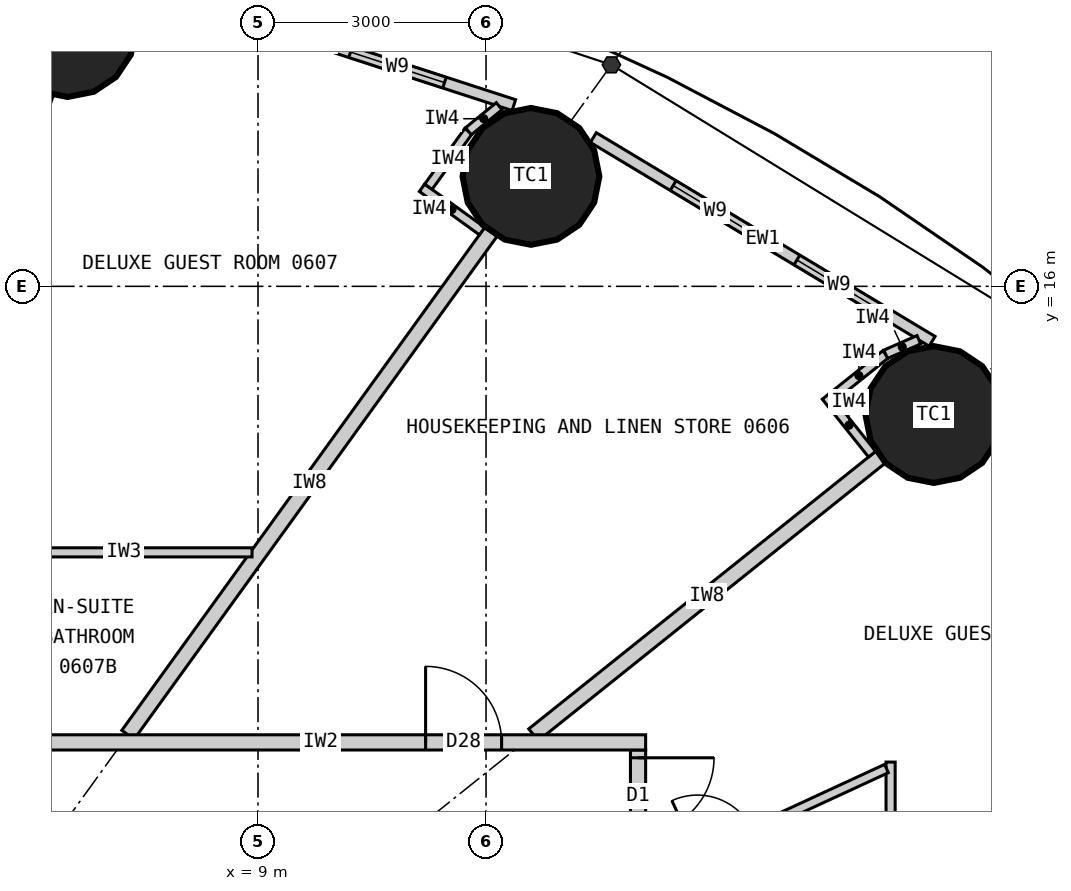
"""IFC4 building model, lengths in metres.
Left out: names, types, materials, properties, quantities, classifications, styles, units other than length and angle.
Written with IfcOpenShell. Run it as: python <this file> out.ifc"""

import sys

from ifc_helpers import new_model, si_unit, direction, frame, frame_2d, origin, origin_2d, place, context, subcontext, project, spatial, rectangle, circle, extrude, element, fill, save


model = new_model("IFC4")
c1 = context("Model", 3, precision=1e-05, world=origin(), true_north=direction((0.0, 1.0)))
c2 = subcontext(c1, "Body", "Model", "MODEL_VIEW")
j1 = project(units=[si_unit("LENGTHUNIT", "METRE"), si_unit("PLANEANGLEUNIT", "RADIAN")], contexts=[c1])
p1 = place(None, origin())
s1 = spatial("IfcSite", under=j1, at=p1, CompositionType="ELEMENT")
p2 = place(p1, origin())
s2 = spatial("IfcBuilding", under=s1, at=p2, CompositionType="ELEMENT")
p3 = place(p2, frame((0.0, 0.0, 32.7)))
s3 = spatial("IfcBuildingStorey", under=s2, at=p3, CompositionType="ELEMENT", Elevation=32.7)
for number, where, z_axis, x_axis in (
    (1, (17.892, 14.313, 0.0), (0.0, 0.0, 1.0), (1.0, 0.0, 0.0)),
    (2, (12.591, 17.447, 0.0), (0.0, 0.0, 1.0), (1.0, 0.0, 0.0)),
    (3, (6.495, 19.391, 0.0), (0.0, 0.0, 1.0), (1.0, 0.0, 0.0)),
):
    element("IfcColumn", number, at=place(p3, frame(where, z_axis=z_axis, x_axis=x_axis)), inside=s3, PredefinedType="COLUMN", context=c2, shape_type="SweptSolid", body=[
        extrude(circle(Radius=0.9, at=origin_2d()), origin(), (0.0, 0.0, 1.0), 3.3),
    ])
p4 = place(p3, frame((17.869, 15.277, 0.0), z_axis=(0.0, 0.0, 1.0), x_axis=(-0.856958191554, 0.515385931054, 0.0)))
e4 = element("IfcWall", 4, at=p4, inside=s3, PredefinedType="ELEMENTEDWALL", context=c2, shape_type="SweptSolid", body=[
    extrude(rectangle(XDim=5.201, YDim=0.15, at=frame_2d((2.601, 0.0))), origin(), (0.0, 0.0, 1.0), 3.12),
])
p5 = place(p4, frame((0.776, 0.0, 0.9)))
e5 = element("IfcOpeningElement", 5, at=p5, cuts=e4, PredefinedType="OPENING", context=c2, shape_type="SweptSolid", body=[
    extrude(rectangle(XDim=1.3, YDim=1.9, at=frame_2d((0.65, 0.95))), frame((0.0, 0.085, 0.0), z_axis=(0.0, -1.0, 0.0), x_axis=(1.0, 0.0, 0.0)), (0.0, 0.0, 1.0), 0.17),
])
p6 = place(p4, frame((2.676, 0.0, 0.9)))
e6 = element("IfcOpeningElement", 6, at=p6, cuts=e4, PredefinedType="OPENING", context=c2, shape_type="SweptSolid", body=[
    extrude(rectangle(XDim=1.3, YDim=1.9, at=frame_2d((0.65, 0.95))), frame((0.0, 0.085, 0.0), z_axis=(0.0, -1.0, 0.0), x_axis=(1.0, 0.0, 0.0)), (0.0, 0.0, 1.0), 0.17),
])
p7 = place(p3, frame((12.366, 18.384, 0.0), z_axis=(0.0, 0.0, 1.0), x_axis=(-0.951138486029, 0.308764603532, 0.0)))
e7 = element("IfcWall", 7, at=p7, inside=s3, PredefinedType="ELEMENTEDWALL", context=c2, shape_type="SweptSolid", body=[
    extrude(rectangle(XDim=5.444, YDim=0.15, at=frame_2d((2.722, 0.0))), origin(), (0.0, 0.0, 1.0), 3.12),
])
p8 = place(p7, frame((0.96, 0.0, 0.9)))
e8 = element("IfcOpeningElement", 8, at=p8, cuts=e7, PredefinedType="OPENING", context=c2, shape_type="SweptSolid", body=[
    extrude(rectangle(XDim=1.3, YDim=1.9, at=frame_2d((0.65, 0.95))), frame((0.0, 0.085, 0.0), z_axis=(0.0, -1.0, 0.0), x_axis=(1.0, 0.0, 0.0)), (0.0, 0.0, 1.0), 0.17),
])
p9 = place(p7, frame((2.86, 0.0, 0.9)))
e9 = element("IfcOpeningElement", 9, at=p9, cuts=e7, PredefinedType="OPENING", context=c2, shape_type="SweptSolid", body=[
    extrude(rectangle(XDim=1.3, YDim=1.9, at=frame_2d((0.65, 0.95))), frame((0.0, 0.085, 0.0), z_axis=(0.0, -1.0, 0.0), x_axis=(1.0, 0.0, 0.0)), (0.0, 0.0, 1.0), 0.17),
])
p10 = place(p3, frame((14.1, 6.512, 0.0), z_axis=(0.0, 0.0, 1.0), x_axis=(0.907842433118, 0.41931147925, 0.0)))
e10 = element("IfcWall", 10, at=p10, inside=s3, PredefinedType="PARTITIONING", context=c2, shape_type="SweptSolid", body=[
    extrude(rectangle(XDim=7.823, YDim=0.2, at=frame_2d((3.912, 0.0))), origin(), (0.0, 0.0, 1.0), 2.32),
])
p11 = place(p3, frame((12.625, 10.1, 0.0), z_axis=(0.0, 0.0, 1.0), x_axis=(0.780872884676, 0.624689953479, 0.0)))
e11 = element("IfcWall", 11, at=p11, inside=s3, PredefinedType="PARTITIONING", context=c2, shape_type="SweptSolid", body=[
    extrude(rectangle(XDim=5.845, YDim=0.2, at=frame_2d((2.922, 0.0))), origin(), (0.0, 0.0, 1.0), 2.32),
])
p12 = place(p3, frame((7.289, 10.1, 0.0), z_axis=(0.0, 0.0, 1.0), x_axis=(0.585216319319, 0.810877216108, 0.0)))
e12 = element("IfcWall", 12, at=p12, inside=s3, PredefinedType="PARTITIONING", context=c2, shape_type="SweptSolid", body=[
    extrude(rectangle(XDim=8.16, YDim=0.2, at=frame_2d((4.08, 0.0))), origin(), (0.0, 0.0, 1.0), 2.32),
])
p13 = place(p3, frame((3.383, 10.1, 0.0), z_axis=(0.0, 0.0, 1.0), x_axis=(0.317593727596, 0.948226884344, 0.0)))
e13 = element("IfcWall", 13, at=p13, inside=s3, PredefinedType="PARTITIONING", context=c2, shape_type="SweptSolid", body=[
    extrude(rectangle(XDim=8.899, YDim=0.2, at=frame_2d((4.449, 0.0))), origin(), (0.0, 0.0, 1.0), 2.32),
])
p14 = place(p3, frame((17.323, 8.101, 0.0), z_axis=(0.0, 0.0, 1.0), x_axis=(0.0, 1.0, 0.0)))
e14 = element("IfcWall", 14, at=p14, inside=s3, PredefinedType="PARTITIONING", context=c2, shape_type="SweptSolid", body=[
    extrude(rectangle(XDim=1.64, YDim=0.12, at=frame_2d((0.82, 0.0))), origin(), (0.0, 0.0, 1.0), 3.12),
])
p15 = place(p3, frame((14.1, 8.193, 0.0), z_axis=(0.0, 0.0, 1.0), x_axis=(0.907836493557, 0.419324338628, 0.0)))
e15 = element("IfcWall", 15, at=p15, inside=s3, PredefinedType="PARTITIONING", context=c2, shape_type="SweptSolid", body=[
    extrude(rectangle(XDim=3.49, YDim=0.12, at=frame_2d((1.745, 0.0))), origin(), (0.0, 0.0, 1.0), 3.12),
])
p16 = place(p15, frame((0.75, 0.0, 0.0)))
e16 = element("IfcOpeningElement", 16, at=p16, cuts=e15, PredefinedType="OPENING", context=c2, shape_type="SweptSolid", body=[
    extrude(rectangle(XDim=0.8, YDim=2.1, at=frame_2d((0.4, 1.05))), frame((0.0, 0.07, 0.0), z_axis=(0.0, -1.0, 0.0), x_axis=(1.0, 0.0, 0.0)), (0.0, 0.0, 1.0), 0.14),
])
p17 = place(p3, frame((8.921, 12.5, 0.0), z_axis=(0.0, 0.0, 1.0), x_axis=(-1.0, 0.0, 0.0)))
e17 = element("IfcWall", 17, at=p17, inside=s3, PredefinedType="PARTITIONING", context=c2, shape_type="SweptSolid", body=[
    extrude(rectangle(XDim=3.372, YDim=0.12, at=frame_2d((1.686, 0.0))), origin(), (0.0, 0.0, 1.0), 3.12),
])
p18 = place(p3, frame((14.0, 4.772, 0.0), z_axis=(0.0, 0.0, 1.0), x_axis=(0.0, 1.0, 0.0)))
e18 = element("IfcWall", 18, at=p18, inside=s3, PredefinedType="PARTITIONING", context=c2, shape_type="SweptSolid", body=[
    extrude(rectangle(XDim=5.127, YDim=0.2, at=frame_2d((2.564, 0.0))), origin(), (0.0, 0.0, 1.0), 3.12),
])
p19 = place(p18, frame((4.025, 0.0, 0.0)))
e19 = element("IfcOpeningElement", 19, at=p19, cuts=e18, PredefinedType="OPENING", context=c2, shape_type="SweptSolid", body=[
    extrude(rectangle(XDim=1.0, YDim=2.2, at=frame_2d((0.5, 1.1))), frame((0.0, 0.11, 0.0), z_axis=(0.0, -1.0, 0.0), x_axis=(1.0, 0.0, 0.0)), (0.0, 0.0, 1.0), 0.22),
])
p20 = place(p3, frame((5.549, 10.0, 0.0), z_axis=(0.0, 0.0, 1.0), x_axis=(1.0, 0.0, 0.0)))
e20 = element("IfcWall", 20, at=p20, inside=s3, PredefinedType="PARTITIONING", context=c2, shape_type="SweptSolid", body=[
    extrude(rectangle(XDim=8.551, YDim=0.2, at=frame_2d((4.275, 0.0))), origin(), (0.0, 0.0, 1.0), 3.12),
])
p21 = place(p20, frame((5.656, 0.0, 0.0)))
e21 = element("IfcOpeningElement", 21, at=p21, cuts=e20, PredefinedType="OPENING", context=c2, shape_type="SweptSolid", body=[
    extrude(rectangle(XDim=1.0, YDim=2.2, at=frame_2d((0.5, 1.1))), frame((0.0, 0.11, 0.0), z_axis=(0.0, -1.0, 0.0), x_axis=(1.0, 0.0, 0.0)), (0.0, 0.0, 1.0), 0.22),
])
p22 = place(p3, frame((17.08, 13.792, 0.0), z_axis=(0.0, 0.0, 1.0), x_axis=(-0.624756144097, 0.780819928289, 0.0)))
e22 = element("IfcWall", 22, at=p22, inside=s3, PredefinedType="PARTITIONING", context=c2, shape_type="SweptSolid", body=[
    extrude(rectangle(XDim=0.975, YDim=0.12, at=frame_2d((0.487, 0.0))), origin(), (0.0, 0.0, 1.0), 3.12),
])
p23 = place(p3, frame((16.555, 14.543, 0.0), z_axis=(0.0, 0.0, 1.0), x_axis=(0.780789399477, 0.62479429708, 0.0)))
e23 = element("IfcWall", 23, at=p23, inside=s3, PredefinedType="PARTITIONING", context=c2, shape_type="SweptSolid", body=[
    extrude(rectangle(XDim=0.9, YDim=0.12, at=frame_2d((0.45, 0.0))), origin(), (0.0, 0.0, 1.0), 3.12),
])
p24 = place(p3, frame((17.258, 15.106, 0.0), z_axis=(0.0, 0.0, 1.0), x_axis=(0.916098562583, 0.400953143937, 0.0)))
e24 = element("IfcWall", 24, at=p24, inside=s3, PredefinedType="PARTITIONING", context=c2, shape_type="SweptSolid", body=[
    extrude(rectangle(XDim=0.477, YDim=0.12, at=frame_2d((0.238, 0.0))), origin(), (0.0, 0.0, 1.0), 3.12),
])
p25 = place(p3, frame((11.948, 16.727, 0.0), z_axis=(0.0, 0.0, 1.0), x_axis=(-0.810897160646, 0.585188683123, 0.0)))
e25 = element("IfcWall", 25, at=p25, inside=s3, PredefinedType="PARTITIONING", context=c2, shape_type="SweptSolid", body=[
    extrude(rectangle(XDim=0.975, YDim=0.12, at=frame_2d((0.487, 0.0))), origin(), (0.0, 0.0, 1.0), 3.12),
])
p26 = place(p3, frame((11.241, 17.31, 0.0), z_axis=(0.0, 0.0, 1.0), x_axis=(0.585054732094, 0.810993810367, 0.0)))
e26 = element("IfcWall", 26, at=p26, inside=s3, PredefinedType="PARTITIONING", context=c2, shape_type="SweptSolid", body=[
    extrude(rectangle(XDim=0.9, YDim=0.12, at=frame_2d((0.45, 0.0))), origin(), (0.0, 0.0, 1.0), 3.12),
])
p27 = place(p3, frame((11.768, 18.04, 0.0), z_axis=(0.0, 0.0, 1.0), x_axis=(0.775268927517, 0.631631292787, 0.0)))
e27 = element("IfcWall", 27, at=p27, inside=s3, PredefinedType="PARTITIONING", context=c2, shape_type="SweptSolid", body=[
    extrude(rectangle(XDim=0.522, YDim=0.12, at=frame_2d((0.261, 0.0))), origin(), (0.0, 0.0, 1.0), 3.12),
])
p28 = place(p5, origin())
e28 = element("IfcWindow", 28, at=p28, inside=s3, PartitioningType="SINGLE_PANEL", PredefinedType="WINDOW", context=c2, shape_type="SweptSolid", body=[
    extrude(rectangle(XDim=1.3, YDim=1.9, at=frame_2d((0.65, 0.95))), frame((0.0, 0.03, 0.0), z_axis=(0.0, -1.0, 0.0), x_axis=(1.0, 0.0, 0.0)), (0.0, 0.0, 1.0), 0.06),
])
fill(e5, e28)
p29 = place(p6, origin())
e29 = element("IfcWindow", 29, at=p29, inside=s3, PartitioningType="SINGLE_PANEL", PredefinedType="WINDOW", context=c2, shape_type="SweptSolid", body=[
    extrude(rectangle(XDim=1.3, YDim=1.9, at=frame_2d((0.65, 0.95))), frame((0.0, 0.03, 0.0), z_axis=(0.0, -1.0, 0.0), x_axis=(1.0, 0.0, 0.0)), (0.0, 0.0, 1.0), 0.06),
])
fill(e6, e29)
p30 = place(p8, origin())
e30 = element("IfcWindow", 30, at=p30, inside=s3, PartitioningType="SINGLE_PANEL", PredefinedType="WINDOW", context=c2, shape_type="SweptSolid", body=[
    extrude(rectangle(XDim=1.3, YDim=1.9, at=frame_2d((0.65, 0.95))), frame((0.0, 0.03, 0.0), z_axis=(0.0, -1.0, 0.0), x_axis=(1.0, 0.0, 0.0)), (0.0, 0.0, 1.0), 0.06),
])
fill(e8, e30)
p31 = place(p19, origin())
e31 = element("IfcDoor", 31, at=p31, inside=s3, OperationType="SINGLE_SWING_RIGHT", PredefinedType="DOOR", context=c2, shape_type="SweptSolid", body=[
    extrude(rectangle(XDim=1.0, YDim=2.2, at=frame_2d((0.5, 1.1))), frame((0.0, 0.025, 0.0), z_axis=(0.0, -1.0, 0.0), x_axis=(1.0, 0.0, 0.0)), (0.0, 0.0, 1.0), 0.05),
])
fill(e19, e31)
p32 = place(p21, origin())
e32 = element("IfcDoor", 32, at=p32, inside=s3, OperationType="SINGLE_SWING_LEFT", PredefinedType="DOOR", context=c2, shape_type="SweptSolid", body=[
    extrude(rectangle(XDim=1.0, YDim=2.2, at=frame_2d((0.5, 1.1))), frame((0.0, 0.025, 0.0), z_axis=(0.0, -1.0, 0.0), x_axis=(1.0, 0.0, 0.0)), (0.0, 0.0, 1.0), 0.05),
])
fill(e21, e32)
save(model, sys.argv[1])
